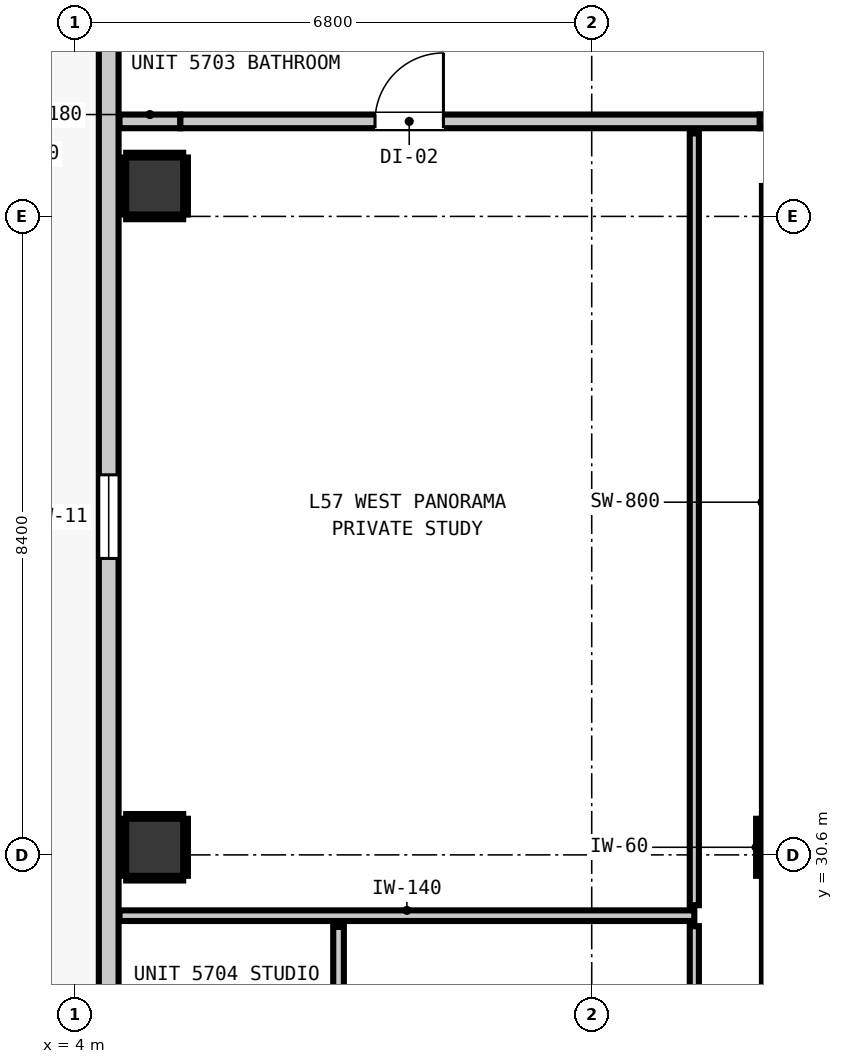
"""IFC4 building model, lengths in metres.
Left out: names, types, materials, properties, quantities, classifications, styles, units other than length and angle.
Written with IfcOpenShell. Run it as: python <this file> out.ifc"""

import sys

from ifc_helpers import new_model, si_unit, direction, frame, frame_2d, origin, origin_2d, place, context, subcontext, project, spatial, rectangle, extrude, element, fill, save


model = new_model("IFC4")
c1 = context("Model", 3, precision=1e-05, world=origin(), true_north=direction((0.0, 1.0)))
c2 = subcontext(c1, "Body", "Model", "MODEL_VIEW")
j1 = project(units=[si_unit("LENGTHUNIT", "METRE"), si_unit("PLANEANGLEUNIT", "RADIAN")], contexts=[c1])
p1 = place(None, origin())
s1 = spatial("IfcSite", under=j1, at=p1, CompositionType="ELEMENT")
p2 = place(p1, origin())
s2 = spatial("IfcBuilding", under=s1, at=p2, CompositionType="ELEMENT")
p3 = place(p2, frame((0.0, 0.0, 196.8)))
s3 = spatial("IfcBuildingStorey", under=s2, at=p3, CompositionType="ELEMENT", Elevation=196.8)
p4 = place(p3, frame((13.4, 30.7, 0.0), z_axis=(0.0, 0.0, 1.0), x_axis=(1.0, 0.0, 0.0)))
e1 = element("IfcColumn", 1, at=p4, inside=s3, PredefinedType="COLUMN", context=c2, shape_type="SweptSolid", body=[
    extrude(rectangle(XDim=0.75, YDim=0.75, at=origin_2d()), origin(), (0.0, 0.0, 1.0), 3.32),
])
p5 = place(p3, frame((13.44, 22.0, 0.0), z_axis=(0.0, 0.0, 1.0), x_axis=(0.0, 1.0, 0.0)))
e2 = element("IfcWall", 2, at=p5, inside=s3, PredefinedType="SHEAR", context=c2, shape_type="SweptSolid", body=[
    extrude(rectangle(XDim=8.32, YDim=0.8, at=frame_2d((4.16, 0.0))), origin(), (0.0, 0.0, 1.0), 3.32),
])
p6 = place(p3, frame((13.44, 31.08, 0.0), z_axis=(0.0, 0.0, 1.0), x_axis=(0.0, 1.0, 0.0)))
e3 = element("IfcWall", 3, at=p6, inside=s3, PredefinedType="SHEAR", context=c2, shape_type="SweptSolid", body=[
    extrude(rectangle(XDim=8.32, YDim=0.8, at=frame_2d((4.16, 0.0))), origin(), (0.0, 0.0, 1.0), 3.32),
])
for number, where, z_axis, x_axis in (
    (4, (5.05, 30.7, 0.0), (0.0, 0.0, 1.0), (1.0, 0.0, 0.0)),
    (5, (5.05, 39.4, 0.0), (0.0, 0.0, 1.0), (1.0, 0.0, 0.0)),
):
    element("IfcColumn", number, at=place(p3, frame(where, z_axis=z_axis, x_axis=x_axis)), inside=s3, PredefinedType="COLUMN", context=c2, shape_type="SweptSolid", body=[
        extrude(rectangle(XDim=0.75, YDim=0.75, at=origin_2d()), origin(), (0.0, 0.0, 1.0), 3.32),
    ])
p7 = place(p3, frame((4.445, 12.345, 0.0), z_axis=(0.0, 0.0, 1.0), x_axis=(0.0, 1.0, 0.0)))
e6 = element("IfcWall", 6, at=p7, inside=s3, PredefinedType="STANDARD", context=c2, shape_type="SweptSolid", body=[
    extrude(rectangle(XDim=30.31, YDim=0.26, at=frame_2d((15.155, 0.0))), origin(), (0.0, 0.0, 1.0), 3.1),
])
p8 = place(p7, frame((0.91, 0.0, 0.0)))
e7 = element("IfcOpeningElement", 7, at=p8, cuts=e6, PredefinedType="OPENING", context=c2, shape_type="SweptSolid", body=[
    extrude(rectangle(XDim=1.0, YDim=2.15, at=frame_2d((0.5, 1.075))), frame((0.0, 0.14, 0.0), z_axis=(0.0, -1.0, 0.0), x_axis=(1.0, 0.0, 0.0)), (0.0, 0.0, 1.0), 0.28),
])
p9 = place(p7, frame((2.322, 0.0, 0.85)))
e8 = element("IfcOpeningElement", 8, at=p9, cuts=e6, PredefinedType="OPENING", context=c2, shape_type="SweptSolid", body=[
    extrude(rectangle(XDim=0.58, YDim=1.5, at=frame_2d((0.29, 0.75))), frame((0.0, 0.14, 0.0), z_axis=(0.0, -1.0, 0.0), x_axis=(1.0, 0.0, 0.0)), (0.0, 0.0, 1.0), 0.28),
])
p10 = place(p7, frame((22.155, 0.0, 0.85)))
e9 = element("IfcOpeningElement", 9, at=p10, cuts=e6, PredefinedType="OPENING", context=c2, shape_type="SweptSolid", body=[
    extrude(rectangle(XDim=1.1, YDim=2.05, at=frame_2d((0.55, 1.025))), frame((0.0, 0.14, 0.0), z_axis=(0.0, -1.0, 0.0), x_axis=(1.0, 0.0, 0.0)), (0.0, 0.0, 1.0), 0.28),
])
p11 = place(p3, frame((4.587, 40.25, 0.0), z_axis=(0.0, 0.0, 1.0), x_axis=(1.0, 0.0, 0.0)))
e10 = element("IfcWall", 10, at=p11, inside=s3, PredefinedType="PARTITIONING", context=c2, shape_type="SweptSolid", body=[
    extrude(rectangle(XDim=0.801, YDim=0.18, at=frame_2d((0.4, 0.0))), origin(), (0.0, 0.0, 1.0), 3.1),
])
p12 = place(p3, frame((5.388, 40.25, 0.0), z_axis=(0.0, 0.0, 1.0), x_axis=(1.0, 0.0, 0.0)))
e11 = element("IfcWall", 11, at=p12, inside=s3, PredefinedType="PARTITIONING", context=c2, shape_type="SweptSolid", body=[
    extrude(rectangle(XDim=7.624, YDim=0.18, at=frame_2d((3.812, 0.0))), origin(), (0.0, 0.0, 1.0), 2.477),
])
p13 = place(p12, frame((2.561, 0.0, 0.0)))
e12 = element("IfcOpeningElement", 12, at=p13, cuts=e11, PredefinedType="OPENING", context=c2, shape_type="SweptSolid", body=[
    extrude(rectangle(XDim=0.9, YDim=2.1, at=frame_2d((0.45, 1.05))), frame((0.0, 0.1, 0.0), z_axis=(0.0, -1.0, 0.0), x_axis=(1.0, 0.0, 0.0)), (0.0, 0.0, 1.0), 0.2),
])
p14 = place(p3, frame((13.012, 40.25, 0.0), z_axis=(0.0, 0.0, 1.0), x_axis=(1.0, 0.0, 0.0)))
e13 = element("IfcWall", 13, at=p14, inside=s3, PredefinedType="PARTITIONING", context=c2, shape_type="SweptSolid", body=[
    extrude(rectangle(XDim=28.201, YDim=0.18, at=frame_2d((14.101, 0.0))), origin(), (0.0, 0.0, 1.0), 3.1),
])
p15 = place(p14, frame((4.423, 0.0, 0.0)))
e14 = element("IfcOpeningElement", 14, at=p15, cuts=e13, PredefinedType="OPENING", context=c2, shape_type="SweptSolid", body=[
    extrude(rectangle(XDim=1.4, YDim=2.15, at=frame_2d((0.7, 1.075))), frame((0.0, 0.1, 0.0), z_axis=(0.0, -1.0, 0.0), x_axis=(1.0, 0.0, 0.0)), (0.0, 0.0, 1.0), 0.2),
])
p16 = place(p3, frame((4.587, 29.8, 0.0), z_axis=(0.0, 0.0, 1.0), x_axis=(1.0, 0.0, 0.0)))
e15 = element("IfcWall", 15, at=p16, inside=s3, PredefinedType="PARTITIONING", context=c2, shape_type="SweptSolid", body=[
    extrude(rectangle(XDim=7.563, YDim=0.14, at=frame_2d((3.781, 0.0))), origin(), (0.0, 0.0, 1.0), 3.1),
])
p17 = place(p3, frame((7.469, 25.017, 0.0), z_axis=(0.0, 0.0, 1.0), x_axis=(0.0, 1.0, 0.0)))
e16 = element("IfcWall", 16, at=p17, inside=s3, PredefinedType="PARTITIONING", context=c2, shape_type="SweptSolid", body=[
    extrude(rectangle(XDim=4.635, YDim=0.14, at=frame_2d((2.317, 0.0))), origin(), (0.0, 0.0, 1.0), 3.1),
])
p18 = place(p17, frame((1.875, 0.0, 0.0)))
e17 = element("IfcOpeningElement", 17, at=p18, cuts=e16, PredefinedType="OPENING", context=c2, shape_type="SweptSolid", body=[
    extrude(rectangle(XDim=0.86, YDim=2.02, at=frame_2d((0.43, 1.01))), frame((0.0, 0.08, 0.0), z_axis=(0.0, -1.0, 0.0), x_axis=(1.0, 0.0, 0.0)), (0.0, 0.0, 1.0), 0.16),
])
p19 = place(p3, frame((12.15, 21.338, 0.0), z_axis=(0.0, 0.0, 1.0), x_axis=(0.0, 1.0, 0.0)))
e18 = element("IfcWall", 18, at=p19, inside=s3, PredefinedType="PARTITIONING", context=c2, shape_type="SweptSolid", body=[
    extrude(rectangle(XDim=8.324, YDim=0.12, at=frame_2d((4.162, 0.0))), origin(), (0.0, 0.0, 1.0), 3.1),
])
p20 = place(p3, frame((12.15, 29.938, 0.0), z_axis=(0.0, 0.0, 1.0), x_axis=(0.0, 1.0, 0.0)))
e19 = element("IfcWall", 19, at=p20, inside=s3, PredefinedType="PARTITIONING", context=c2, shape_type="SweptSolid", body=[
    extrude(rectangle(XDim=10.154, YDim=0.12, at=frame_2d((5.077, 0.0))), origin(), (0.0, 0.0, 1.0), 3.1),
])
for number, where, z_axis, x_axis in (
    (20, (12.993, 30.325, 0.0), (0.0, 0.0, 1.0), (0.0, 1.0, 0.0)),
    (21, (4.675, 30.293, 0.0), (0.0, 0.0, 1.0), (1.0, 0.0, 0.0)),
    (22, (4.675, 31.107, 0.0), (0.0, 0.0, 1.0), (1.0, 0.0, 0.0)),
    (23, (4.643, 30.325, 0.0), (0.0, 0.0, 1.0), (0.0, 1.0, 0.0)),
    (24, (5.457, 30.325, 0.0), (0.0, 0.0, 1.0), (0.0, 1.0, 0.0)),
    (25, (4.675, 38.993, 0.0), (0.0, 0.0, 1.0), (1.0, 0.0, 0.0)),
    (26, (4.675, 39.807, 0.0), (0.0, 0.0, 1.0), (1.0, 0.0, 0.0)),
    (27, (4.643, 39.025, 0.0), (0.0, 0.0, 1.0), (0.0, 1.0, 0.0)),
    (28, (5.457, 39.025, 0.0), (0.0, 0.0, 1.0), (0.0, 1.0, 0.0)),
):
    element("IfcWall", number, at=place(p3, frame(where, z_axis=z_axis, x_axis=x_axis)), inside=s3, PredefinedType="PARTITIONING", context=c2, shape_type="SweptSolid", body=[
        extrude(rectangle(XDim=0.75, YDim=0.06, at=frame_2d((0.375, 0.0))), origin(), (0.0, 0.0, 1.0), 1.45),
    ])
p21 = place(p10, origin())
e29 = element("IfcWindow", 29, at=p21, inside=s3, PartitioningType="SINGLE_PANEL", PredefinedType="WINDOW", context=c2, shape_type="SweptSolid", body=[
    extrude(rectangle(XDim=1.1, YDim=2.05, at=frame_2d((0.55, 1.025))), frame((0.0, 0.03, 0.0), z_axis=(0.0, -1.0, 0.0), x_axis=(1.0, 0.0, 0.0)), (0.0, 0.0, 1.0), 0.06),
])
fill(e9, e29)
p22 = place(p13, origin())
e30 = element("IfcDoor", 30, at=p22, inside=s3, OperationType="SINGLE_SWING_RIGHT", PredefinedType="DOOR", context=c2, shape_type="SweptSolid", body=[
    extrude(rectangle(XDim=0.9, YDim=2.1, at=frame_2d((0.45, 1.05))), frame((0.0, 0.025, 0.0), z_axis=(0.0, -1.0, 0.0), x_axis=(1.0, 0.0, 0.0)), (0.0, 0.0, 1.0), 0.05),
])
fill(e12, e30)
save(model, sys.argv[1])
